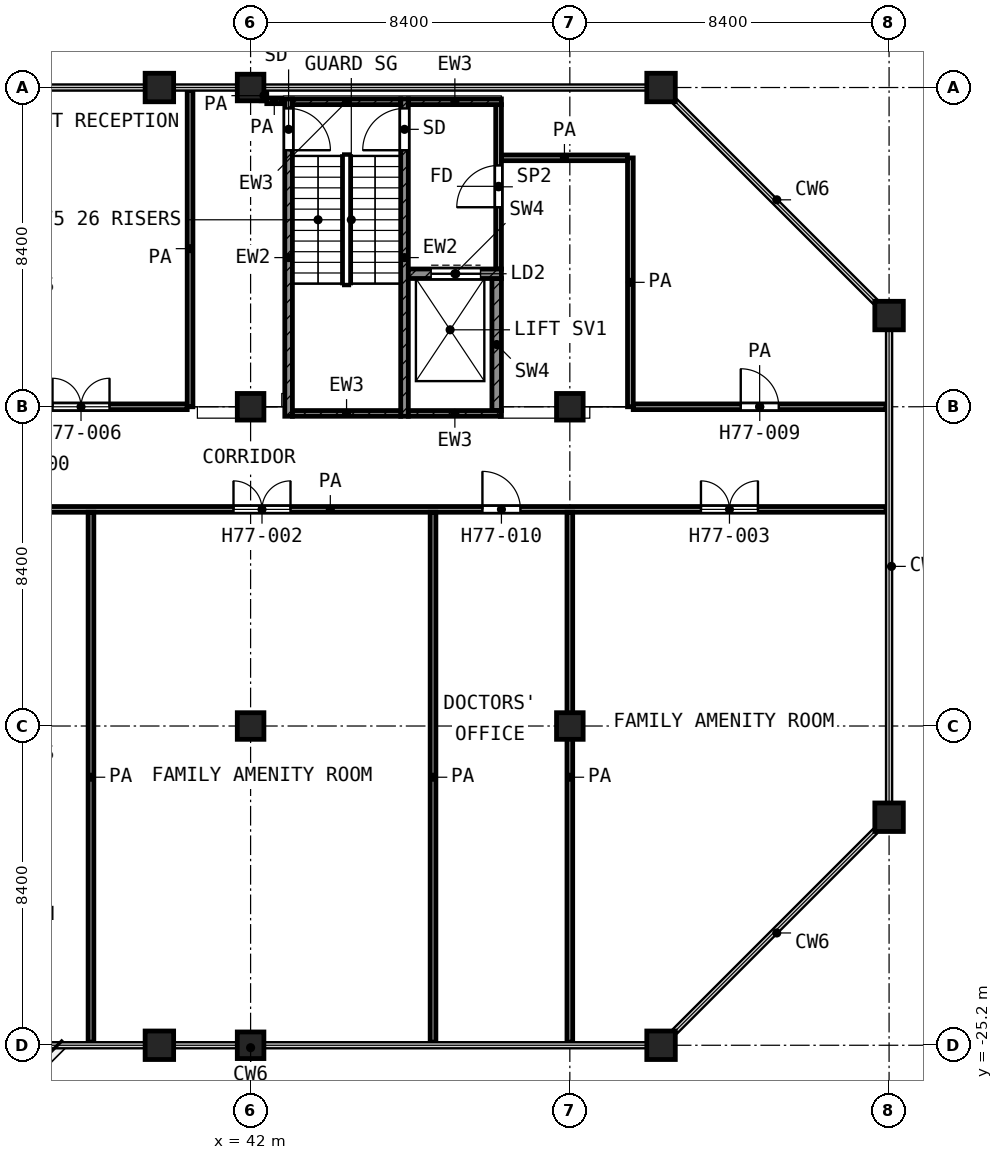
"""IFC4 building model, lengths in metres.
Left out: names, types, materials, properties, quantities, classifications, styles, units other than length and angle.
Written with IfcOpenShell. Run it as: python <this file> out.ifc"""

import sys

from ifc_helpers import new_model, si_unit, direction, frame, frame_2d, origin, origin_2d, place, context, subcontext, project, spatial, rectangle, extrude, element, fill, save


model = new_model("IFC4")
c1 = context("Model", 3, precision=1e-05, world=origin(), true_north=direction((0.0, 1.0)))
c2 = subcontext(c1, "Body", "Model", "MODEL_VIEW")
j1 = project(units=[si_unit("LENGTHUNIT", "METRE"), si_unit("PLANEANGLEUNIT", "RADIAN")], contexts=[c1])
p1 = place(None, origin())
s1 = spatial("IfcSite", under=j1, at=p1, CompositionType="ELEMENT")
p2 = place(p1, origin())
s2 = spatial("IfcBuilding", under=s1, at=p2, CompositionType="ELEMENT")
p3 = place(p2, frame((0.0, 0.0, 332.2)))
s3 = spatial("IfcBuildingStorey", under=s2, at=p3, CompositionType="ELEMENT", Elevation=332.2)
p4 = place(p3, frame((42.0, 0.0, 0.0), z_axis=(0.0, 0.0, 1.0), x_axis=(1.0, 0.0, 0.0)))
e1 = element("IfcColumn", 1, at=p4, inside=s3, PredefinedType="COLUMN", context=c2, shape_type="SweptSolid", body=[
    extrude(rectangle(XDim=0.7, YDim=0.7, at=origin_2d()), origin(), (0.0, 0.0, 1.0), 4.5),
])
for number, where, z_axis, x_axis in (
    (2, (52.8, 0.0, 0.0), (0.0, 0.0, 1.0), (1.0, 0.0, 0.0)),
    (3, (58.8, -6.0, 0.0), (0.0, 0.0, 1.0), (1.0, 0.0, 0.0)),
):
    element("IfcColumn", number, at=place(p3, frame(where, z_axis=z_axis, x_axis=x_axis)), inside=s3, PredefinedType="COLUMN", context=c2, shape_type="SweptSolid", body=[
        extrude(rectangle(XDim=0.75, YDim=0.75, at=origin_2d()), origin(), (0.0, 0.0, 1.0), 4.5),
    ])
for number, where, z_axis, x_axis in (
    (4, (42.0, -8.4, 0.0), (0.0, 0.0, 1.0), (1.0, 0.0, 0.0)),
    (5, (50.4, -8.4, 0.0), (0.0, 0.0, 1.0), (1.0, 0.0, 0.0)),
    (6, (42.0, -16.8, 0.0), (0.0, 0.0, 1.0), (1.0, 0.0, 0.0)),
    (7, (50.4, -16.8, 0.0), (0.0, 0.0, 1.0), (1.0, 0.0, 0.0)),
):
    element("IfcColumn", number, at=place(p3, frame(where, z_axis=z_axis, x_axis=x_axis)), inside=s3, PredefinedType="COLUMN", context=c2, shape_type="SweptSolid", body=[
        extrude(rectangle(XDim=0.7, YDim=0.7, at=origin_2d()), origin(), (0.0, 0.0, 1.0), 4.5),
    ])
p5 = place(p3, frame((58.8, -19.2, 0.0), z_axis=(0.0, 0.0, 1.0), x_axis=(1.0, 0.0, 0.0)))
e8 = element("IfcColumn", 8, at=p5, inside=s3, PredefinedType="COLUMN", context=c2, shape_type="SweptSolid", body=[
    extrude(rectangle(XDim=0.75, YDim=0.75, at=origin_2d()), origin(), (0.0, 0.0, 1.0), 4.5),
])
p6 = place(p3, frame((42.0, -25.2, 0.0), z_axis=(0.0, 0.0, 1.0), x_axis=(1.0, 0.0, 0.0)))
e9 = element("IfcColumn", 9, at=p6, inside=s3, PredefinedType="COLUMN", context=c2, shape_type="SweptSolid", body=[
    extrude(rectangle(XDim=0.7, YDim=0.7, at=origin_2d()), origin(), (0.0, 0.0, 1.0), 4.5),
])
for number, where, z_axis, x_axis in (
    (10, (52.8, -25.2, 0.0), (0.0, 0.0, 1.0), (1.0, 0.0, 0.0)),
    (11, (39.6, 0.0, 0.0), (0.0, 0.0, 1.0), (1.0, 0.0, 0.0)),
    (12, (39.6, -25.2, 0.0), (0.0, 0.0, 1.0), (1.0, 0.0, 0.0)),
):
    element("IfcColumn", number, at=place(p3, frame(where, z_axis=z_axis, x_axis=x_axis)), inside=s3, PredefinedType="COLUMN", context=c2, shape_type="SweptSolid", body=[
        extrude(rectangle(XDim=0.75, YDim=0.75, at=origin_2d()), origin(), (0.0, 0.0, 1.0), 4.5),
    ])
p7 = place(p3, frame((39.228, -25.075, 4.5), z_axis=(0.0, 0.0, 1.0), x_axis=(-1.0, 0.0, 0.0)))
e13 = element("IfcWall", 13, at=p7, inside=s3, PredefinedType="SOLIDWALL", context=c2, shape_type="SweptSolid", body=[
    extrude(rectangle(XDim=8.131, YDim=0.25, at=frame_2d((4.065, 0.0))), origin(), (0.0, 0.0, 1.0), 1.1),
])
p8 = place(p3, frame((25.375, -0.125, 4.5), z_axis=(0.0, 0.0, 1.0), x_axis=(1.0, 0.0, 0.0)))
e14 = element("IfcWall", 14, at=p8, inside=s3, PredefinedType="SOLIDWALL", context=c2, shape_type="SweptSolid", body=[
    extrude(rectangle(XDim=13.853, YDim=0.25, at=frame_2d((6.926, 0.0))), origin(), (0.0, 0.0, 1.0), 1.1),
])
p9 = place(p3, frame((43.0, -8.65, 0.0), z_axis=(0.0, 0.0, 1.0), x_axis=(0.0, 1.0, 0.0)))
e15 = element("IfcWall", 15, at=p9, inside=s3, PredefinedType="SHEAR", context=c2, shape_type="SweptSolid", body=[
    extrude(rectangle(XDim=8.35, YDim=0.2, at=frame_2d((4.175, 0.0))), origin(), (0.0, 0.0, 1.0), 3.95),
])
p10 = place(p9, frame((7.0, 0.0, 0.0)))
e16 = element("IfcOpeningElement", 16, at=p10, cuts=e15, PredefinedType="OPENING", context=c2, shape_type="SweptSolid", body=[
    extrude(rectangle(XDim=1.1, YDim=2.1, at=frame_2d((0.55, 1.05))), frame((0.0, 0.11, 0.0), z_axis=(0.0, -1.0, 0.0), x_axis=(1.0, 0.0, 0.0)), (0.0, 0.0, 1.0), 0.22),
])
p11 = place(p3, frame((46.05, -8.65, 0.0), z_axis=(0.0, 0.0, 1.0), x_axis=(0.0, 1.0, 0.0)))
e17 = element("IfcWall", 17, at=p11, inside=s3, PredefinedType="SHEAR", context=c2, shape_type="SweptSolid", body=[
    extrude(rectangle(XDim=8.35, YDim=0.2, at=frame_2d((4.175, 0.0))), origin(), (0.0, 0.0, 1.0), 3.95),
])
p12 = place(p11, frame((7.0, 0.0, 0.0)))
e18 = element("IfcOpeningElement", 18, at=p12, cuts=e17, PredefinedType="OPENING", context=c2, shape_type="SweptSolid", body=[
    extrude(rectangle(XDim=1.1, YDim=2.1, at=frame_2d((0.55, 1.05))), frame((0.0, 0.11, 0.0), z_axis=(0.0, -1.0, 0.0), x_axis=(1.0, 0.0, 0.0)), (0.0, 0.0, 1.0), 0.22),
])
p13 = place(p3, frame((43.1, -0.375, 0.0), z_axis=(0.0, 0.0, 1.0), x_axis=(1.0, 0.0, 0.0)))
e19 = element("IfcWall", 19, at=p13, inside=s3, PredefinedType="SHEAR", context=c2, shape_type="SweptSolid", body=[
    extrude(rectangle(XDim=2.85, YDim=0.15, at=frame_2d((1.425, 0.0))), origin(), (0.0, 0.0, 1.0), 3.95),
])
p14 = place(p3, frame((46.15, -0.375, 0.0), z_axis=(0.0, 0.0, 1.0), x_axis=(1.0, 0.0, 0.0)))
e20 = element("IfcWall", 20, at=p14, inside=s3, PredefinedType="SHEAR", context=c2, shape_type="SweptSolid", body=[
    extrude(rectangle(XDim=2.45, YDim=0.15, at=frame_2d((1.225, 0.0))), origin(), (0.0, 0.0, 1.0), 3.95),
])
p15 = place(p3, frame((43.1, -8.575, 0.0), z_axis=(0.0, 0.0, 1.0), x_axis=(1.0, 0.0, 0.0)))
e21 = element("IfcWall", 21, at=p15, inside=s3, PredefinedType="SHEAR", context=c2, shape_type="SweptSolid", body=[
    extrude(rectangle(XDim=2.85, YDim=0.15, at=frame_2d((1.425, 0.0))), origin(), (0.0, 0.0, 1.0), 3.95),
])
p16 = place(p3, frame((46.15, -8.575, 0.0), z_axis=(0.0, 0.0, 1.0), x_axis=(1.0, 0.0, 0.0)))
e22 = element("IfcWall", 22, at=p16, inside=s3, PredefinedType="SHEAR", context=c2, shape_type="SweptSolid", body=[
    extrude(rectangle(XDim=2.45, YDim=0.15, at=frame_2d((1.225, 0.0))), origin(), (0.0, 0.0, 1.0), 3.95),
])
p17 = place(p3, frame((46.15, -4.9, 0.0), z_axis=(0.0, 0.0, 1.0), x_axis=(1.0, 0.0, 0.0)))
e23 = element("IfcWall", 23, at=p17, inside=s3, PredefinedType="SHEAR", context=c2, shape_type="SweptSolid", body=[
    extrude(rectangle(XDim=2.45, YDim=0.25, at=frame_2d((1.225, 0.0))), origin(), (0.0, 0.0, 1.0), 3.95),
])
p18 = place(p17, frame((0.6, 0.0, 0.0)))
e24 = element("IfcOpeningElement", 24, at=p18, cuts=e23, PredefinedType="OPENING", context=c2, shape_type="SweptSolid", body=[
    extrude(rectangle(XDim=1.3, YDim=2.1, at=frame_2d((0.65, 1.05))), frame((0.0, 0.135, 0.0), z_axis=(0.0, -1.0, 0.0), x_axis=(1.0, 0.0, 0.0)), (0.0, 0.0, 1.0), 0.27),
])
p19 = place(p3, frame((48.475, -8.5, 0.0), z_axis=(0.0, 0.0, 1.0), x_axis=(0.0, 1.0, 0.0)))
e25 = element("IfcWall", 25, at=p19, inside=s3, PredefinedType="SHEAR", context=c2, shape_type="SweptSolid", body=[
    extrude(rectangle(XDim=3.475, YDim=0.25, at=frame_2d((1.738, 0.0))), origin(), (0.0, 0.0, 1.0), 3.95),
])
p20 = place(p3, frame((48.525, -4.775, 0.0), z_axis=(0.0, 0.0, 1.0), x_axis=(0.0, 1.0, 0.0)))
e26 = element("IfcWall", 26, at=p20, inside=s3, PredefinedType="PARTITIONING", context=c2, shape_type="SweptSolid", body=[
    extrude(rectangle(XDim=4.325, YDim=0.15, at=frame_2d((2.163, 0.0))), origin(), (0.0, 0.0, 1.0), 3.95),
])
p21 = place(p20, frame((1.625, 0.0, 0.0)))
e27 = element("IfcOpeningElement", 27, at=p21, cuts=e26, PredefinedType="OPENING", context=c2, shape_type="SweptSolid", body=[
    extrude(rectangle(XDim=1.1, YDim=2.1, at=frame_2d((0.55, 1.05))), frame((0.0, 0.085, 0.0), z_axis=(0.0, -1.0, 0.0), x_axis=(1.0, 0.0, 0.0)), (0.0, 0.0, 1.0), 0.17),
])
p22 = place(p3, frame((29.475, -11.1, 0.0), z_axis=(0.0, 0.0, 1.0), x_axis=(1.0, 0.0, 0.0)))
e28 = element("IfcWall", 28, at=p22, inside=s3, PredefinedType="PARTITIONING", context=c2, shape_type="SweptSolid", body=[
    extrude(rectangle(XDim=29.245, YDim=0.15, at=frame_2d((14.623, 0.0))), origin(), (0.0, 0.0, 1.0), 3.95),
])
p23 = place(p22, frame((3.375, 0.0, 0.0)))
e29 = element("IfcOpeningElement", 29, at=p23, cuts=e28, PredefinedType="OPENING", context=c2, shape_type="SweptSolid", body=[
    extrude(rectangle(XDim=1.5, YDim=2.1, at=frame_2d((0.75, 1.05))), frame((0.0, 0.085, 0.0), z_axis=(0.0, -1.0, 0.0), x_axis=(1.0, 0.0, 0.0)), (0.0, 0.0, 1.0), 0.17),
])
p24 = place(p22, frame((12.075, 0.0, 0.0)))
e30 = element("IfcOpeningElement", 30, at=p24, cuts=e28, PredefinedType="OPENING", context=c2, shape_type="SweptSolid", body=[
    extrude(rectangle(XDim=1.5, YDim=2.1, at=frame_2d((0.75, 1.05))), frame((0.0, 0.085, 0.0), z_axis=(0.0, -1.0, 0.0), x_axis=(1.0, 0.0, 0.0)), (0.0, 0.0, 1.0), 0.17),
])
p25 = place(p22, frame((18.625, 0.0, 0.0)))
e31 = element("IfcOpeningElement", 31, at=p25, cuts=e28, PredefinedType="OPENING", context=c2, shape_type="SweptSolid", body=[
    extrude(rectangle(XDim=1.0, YDim=2.1, at=frame_2d((0.5, 1.05))), frame((0.0, 0.085, 0.0), z_axis=(0.0, -1.0, 0.0), x_axis=(1.0, 0.0, 0.0)), (0.0, 0.0, 1.0), 0.17),
])
p26 = place(p22, frame((24.375, 0.0, 0.0)))
e32 = element("IfcOpeningElement", 32, at=p26, cuts=e28, PredefinedType="OPENING", context=c2, shape_type="SweptSolid", body=[
    extrude(rectangle(XDim=1.5, YDim=2.1, at=frame_2d((0.75, 1.05))), frame((0.0, 0.085, 0.0), z_axis=(0.0, -1.0, 0.0), x_axis=(1.0, 0.0, 0.0)), (0.0, 0.0, 1.0), 0.17),
])
p27 = place(p3, frame((24.6, -8.4, 0.0), z_axis=(0.0, 0.0, 1.0), x_axis=(1.0, 0.0, 0.0)))
e33 = element("IfcWall", 33, at=p27, inside=s3, PredefinedType="PARTITIONING", context=c2, shape_type="SweptSolid", body=[
    extrude(rectangle(XDim=15.732, YDim=0.15, at=frame_2d((7.866, 0.0))), origin(), (0.0, 0.0, 1.0), 3.95),
])
p28 = place(p27, frame((3.3, 0.0, 0.0)))
e34 = element("IfcOpeningElement", 34, at=p28, cuts=e33, PredefinedType="OPENING", context=c2, shape_type="SweptSolid", body=[
    extrude(rectangle(XDim=1.2, YDim=2.1, at=frame_2d((0.6, 1.05))), frame((0.0, 0.085, 0.0), z_axis=(0.0, -1.0, 0.0), x_axis=(1.0, 0.0, 0.0)), (0.0, 0.0, 1.0), 0.17),
])
p29 = place(p27, frame((9.419, 0.0, 0.0)))
e35 = element("IfcOpeningElement", 35, at=p29, cuts=e33, PredefinedType="OPENING", context=c2, shape_type="SweptSolid", body=[
    extrude(rectangle(XDim=1.5, YDim=2.1, at=frame_2d((0.75, 1.05))), frame((0.0, 0.085, 0.0), z_axis=(0.0, -1.0, 0.0), x_axis=(1.0, 0.0, 0.0)), (0.0, 0.0, 1.0), 0.17),
])
p30 = place(p27, frame((12.188, 0.0, 0.0)))
e36 = element("IfcOpeningElement", 36, at=p30, cuts=e33, PredefinedType="OPENING", context=c2, shape_type="SweptSolid", body=[
    extrude(rectangle(XDim=1.5, YDim=2.1, at=frame_2d((0.75, 1.05))), frame((0.0, 0.085, 0.0), z_axis=(0.0, -1.0, 0.0), x_axis=(1.0, 0.0, 0.0)), (0.0, 0.0, 1.0), 0.17),
])
p31 = place(p3, frame((52.068, -8.4, 0.0), z_axis=(0.0, 0.0, 1.0), x_axis=(1.0, 0.0, 0.0)))
e37 = element("IfcWall", 37, at=p31, inside=s3, PredefinedType="PARTITIONING", context=c2, shape_type="SweptSolid", body=[
    extrude(rectangle(XDim=6.652, YDim=0.15, at=frame_2d((3.326, 0.0))), origin(), (0.0, 0.0, 1.0), 3.95),
])
p32 = place(p31, frame((2.829, 0.0, 0.0)))
e38 = element("IfcOpeningElement", 38, at=p32, cuts=e37, PredefinedType="OPENING", context=c2, shape_type="SweptSolid", body=[
    extrude(rectangle(XDim=1.0, YDim=2.1, at=frame_2d((0.5, 1.05))), frame((0.0, 0.085, 0.0), z_axis=(0.0, -1.0, 0.0), x_axis=(1.0, 0.0, 0.0)), (0.0, 0.0, 1.0), 0.17),
])
p33 = place(p3, frame((48.6, -1.85, 0.0), z_axis=(0.0, 0.0, 1.0), x_axis=(1.0, 0.0, 0.0)))
e39 = element("IfcWall", 39, at=p33, inside=s3, PredefinedType="PARTITIONING", context=c2, shape_type="SweptSolid", body=[
    extrude(rectangle(XDim=3.316, YDim=0.15, at=frame_2d((1.658, 0.0))), origin(), (0.0, 0.0, 1.0), 3.95),
])
p34 = place(p3, frame((42.426, -0.35, 0.0), z_axis=(0.0, 0.0, 1.0), x_axis=(1.0, 0.0, 0.0)))
e40 = element("IfcWall", 40, at=p34, inside=s3, PredefinedType="PARTITIONING", context=c2, shape_type="SweptSolid", body=[
    extrude(rectangle(XDim=0.394, YDim=0.15, at=frame_2d((0.197, 0.0))), origin(), (0.0, 0.0, 1.0), 3.95),
])
p35 = place(p3, frame((37.8, -25.12, 0.0), z_axis=(0.0, 0.0, 1.0), x_axis=(0.0, 1.0, 0.0)))
e41 = element("IfcWall", 41, at=p35, inside=s3, PredefinedType="PARTITIONING", context=c2, shape_type="SweptSolid", body=[
    extrude(rectangle(XDim=13.945, YDim=0.15, at=frame_2d((6.973, 0.0))), origin(), (0.0, 0.0, 1.0), 3.95),
])
p36 = place(p3, frame((40.407, -8.4, 0.0), z_axis=(0.0, 0.0, 1.0), x_axis=(0.0, 1.0, 0.0)))
e42 = element("IfcWall", 42, at=p36, inside=s3, PredefinedType="PARTITIONING", context=c2, shape_type="SweptSolid", body=[
    extrude(rectangle(XDim=8.32, YDim=0.15, at=frame_2d((4.16, 0.0))), origin(), (0.0, 0.0, 1.0), 3.95),
])
p37 = place(p3, frame((42.35, -0.348, 0.0), z_axis=(0.0, 0.0, 1.0), x_axis=(0.0, 1.0, 0.0)))
e43 = element("IfcWall", 43, at=p37, inside=s3, PredefinedType="PARTITIONING", context=c2, shape_type="SweptSolid", body=[
    extrude(rectangle(XDim=0.268, YDim=0.15, at=frame_2d((0.134, 0.0))), origin(), (0.0, 0.0, 1.0), 3.95),
])
for number, where, z_axis, x_axis in (
    (44, (46.8, -25.12, 0.0), (0.0, 0.0, 1.0), (0.0, 1.0, 0.0)),
    (45, (50.4, -25.12, 0.0), (0.0, 0.0, 1.0), (0.0, 1.0, 0.0)),
):
    element("IfcWall", number, at=place(p3, frame(where, z_axis=z_axis, x_axis=x_axis)), inside=s3, PredefinedType="PARTITIONING", context=c2, shape_type="SweptSolid", body=[
        extrude(rectangle(XDim=13.945, YDim=0.15, at=frame_2d((6.973, 0.0))), origin(), (0.0, 0.0, 1.0), 3.95),
    ])
p38 = place(p3, frame((51.993, -8.4, 0.0), z_axis=(0.0, 0.0, 1.0), x_axis=(0.0, 1.0, 0.0)))
e46 = element("IfcWall", 46, at=p38, inside=s3, PredefinedType="PARTITIONING", context=c2, shape_type="SweptSolid", body=[
    extrude(rectangle(XDim=6.548, YDim=0.15, at=frame_2d((3.274, 0.0))), origin(), (0.0, 0.0, 1.0), 3.95),
])
p39 = place(p10, frame((1.1, 0.0, 0.0), z_axis=(0.0, 0.0, 1.0), x_axis=(-1.0, 0.0, 0.0)))
e47 = element("IfcDoor", 47, at=p39, inside=s3, OperationType="SINGLE_SWING_LEFT", PredefinedType="DOOR", context=c2, shape_type="SweptSolid", body=[
    extrude(rectangle(XDim=1.1, YDim=2.1, at=frame_2d((0.55, 1.05))), frame((0.0, 0.025, 0.0), z_axis=(0.0, -1.0, 0.0), x_axis=(1.0, 0.0, 0.0)), (0.0, 0.0, 1.0), 0.05),
])
fill(e16, e47)
p40 = place(p12, origin())
e48 = element("IfcDoor", 48, at=p40, inside=s3, OperationType="SINGLE_SWING_LEFT", PredefinedType="DOOR", context=c2, shape_type="SweptSolid", body=[
    extrude(rectangle(XDim=1.1, YDim=2.1, at=frame_2d((0.55, 1.05))), frame((0.0, 0.025, 0.0), z_axis=(0.0, -1.0, 0.0), x_axis=(1.0, 0.0, 0.0)), (0.0, 0.0, 1.0), 0.05),
])
fill(e18, e48)
p41 = place(p18, origin())
e49 = element("IfcDoor", 49, at=p41, inside=s3, OperationType="DOUBLE_DOOR_SLIDING", PredefinedType="DOOR", context=c2, shape_type="SweptSolid", body=[
    extrude(rectangle(XDim=1.3, YDim=2.1, at=frame_2d((0.65, 1.05))), frame((0.0, 0.025, 0.0), z_axis=(0.0, -1.0, 0.0), x_axis=(1.0, 0.0, 0.0)), (0.0, 0.0, 1.0), 0.05),
])
fill(e24, e49)
p42 = place(p21, origin())
e50 = element("IfcDoor", 50, at=p42, inside=s3, OperationType="SINGLE_SWING_LEFT", PredefinedType="DOOR", context=c2, shape_type="SweptSolid", body=[
    extrude(rectangle(XDim=1.1, YDim=2.1, at=frame_2d((0.55, 1.05))), frame((0.0, 0.025, 0.0), z_axis=(0.0, -1.0, 0.0), x_axis=(1.0, 0.0, 0.0)), (0.0, 0.0, 1.0), 0.05),
])
fill(e27, e50)
p43 = place(p32, origin())
e51 = element("IfcDoor", 51, at=p43, inside=s3, OperationType="SINGLE_SWING_LEFT", PredefinedType="DOOR", context=c2, shape_type="SweptSolid", body=[
    extrude(rectangle(XDim=1.0, YDim=2.1, at=frame_2d((0.5, 1.05))), frame((0.0, 0.025, 0.0), z_axis=(0.0, -1.0, 0.0), x_axis=(1.0, 0.0, 0.0)), (0.0, 0.0, 1.0), 0.05),
])
fill(e38, e51)
p44 = place(p24, origin())
e52 = element("IfcDoor", 52, at=p44, inside=s3, OperationType="DOUBLE_DOOR_SINGLE_SWING", PredefinedType="DOOR", context=c2, shape_type="SweptSolid", body=[
    extrude(rectangle(XDim=1.5, YDim=2.1, at=frame_2d((0.75, 1.05))), frame((0.0, 0.025, 0.0), z_axis=(0.0, -1.0, 0.0), x_axis=(1.0, 0.0, 0.0)), (0.0, 0.0, 1.0), 0.05),
])
fill(e30, e52)
p45 = place(p25, origin())
e53 = element("IfcDoor", 53, at=p45, inside=s3, OperationType="SINGLE_SWING_LEFT", PredefinedType="DOOR", context=c2, shape_type="SweptSolid", body=[
    extrude(rectangle(XDim=1.0, YDim=2.1, at=frame_2d((0.5, 1.05))), frame((0.0, 0.025, 0.0), z_axis=(0.0, -1.0, 0.0), x_axis=(1.0, 0.0, 0.0)), (0.0, 0.0, 1.0), 0.05),
])
fill(e31, e53)
p46 = place(p26, origin())
e54 = element("IfcDoor", 54, at=p46, inside=s3, OperationType="DOUBLE_DOOR_SINGLE_SWING", PredefinedType="DOOR", context=c2, shape_type="SweptSolid", body=[
    extrude(rectangle(XDim=1.5, YDim=2.1, at=frame_2d((0.75, 1.05))), frame((0.0, 0.025, 0.0), z_axis=(0.0, -1.0, 0.0), x_axis=(1.0, 0.0, 0.0)), (0.0, 0.0, 1.0), 0.05),
])
fill(e32, e54)
p47 = place(p30, origin())
e55 = element("IfcDoor", 55, at=p47, inside=s3, OperationType="DOUBLE_DOOR_SINGLE_SWING", PredefinedType="DOOR", context=c2, shape_type="SweptSolid", body=[
    extrude(rectangle(XDim=1.5, YDim=2.1, at=frame_2d((0.75, 1.05))), frame((0.0, 0.025, 0.0), z_axis=(0.0, -1.0, 0.0), x_axis=(1.0, 0.0, 0.0)), (0.0, 0.0, 1.0), 0.05),
])
fill(e36, e55)
save(model, sys.argv[1])
